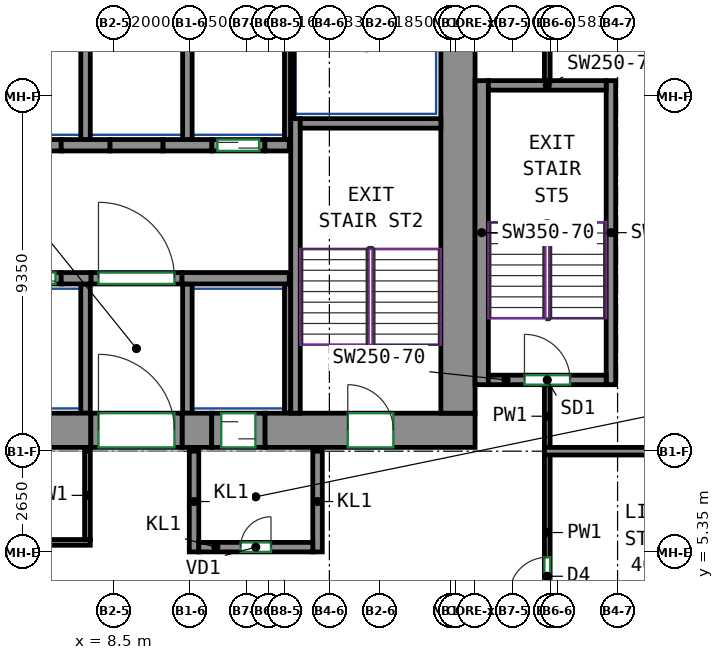
"""IFC4 building model, lengths in metres.
Left out: names, types, materials, properties, quantities, classifications, styles, units other than length and angle.
Written with IfcOpenShell. Run it as: python <this file> out.ifc"""

import sys

from ifc_helpers import new_model, si_unit, direction, frame, frame_2d, origin, place, context, subcontext, project, spatial, rectangle, extrude, source, transform, mapped, element, fill, save


model = new_model("IFC4")
c1 = context("Model", 3, precision=1e-05, world=origin(), true_north=direction((0.0, 1.0)))
c2 = subcontext(c1, "Body", "Model", "MODEL_VIEW")
j1 = project(units=[si_unit("LENGTHUNIT", "METRE"), si_unit("PLANEANGLEUNIT", "RADIAN")], contexts=[c1])
p1 = place(None, origin())
s1 = spatial("IfcSite", under=j1, at=p1, CompositionType="ELEMENT")
p2 = place(p1, origin())
s2 = spatial("IfcBuilding", under=s1, at=p2, CompositionType="ELEMENT")
p3 = place(p2, frame((0.0, 0.0, 171.9)))
s3 = spatial("IfcBuildingStorey", under=s2, at=p3, CompositionType="ELEMENT", Elevation=171.9)
m1 = source(origin(), c2, "Body", "SweptSolid", [
    extrude(rectangle(XDim=14.18, YDim=0.9, at=frame_2d((7.09, 0.0))), origin(), (0.0, 0.0, 1.0), 3.12),
])
p4 = place(p3, frame((-6.29, 8.55, 0.0), z_axis=(0.0, 0.0, 1.0), x_axis=(1.0, 0.0, 0.0)))
e1 = element("IfcWall", 1, at=p4, inside=s3, PredefinedType="SHEAR", context=c2, shape_type="MappedRepresentation", body=[
    mapped(m1, transform((0.0, 0.0, 0.0))),
])
m2 = source(origin(), c2, "Body", "SweptSolid", [
    extrude(rectangle(XDim=0.78, YDim=0.9, at=frame_2d((0.39, 0.0))), origin(), (0.0, 0.0, 1.0), 3.12),
])
p5 = place(p3, frame((10.29, 8.55, 0.0), z_axis=(0.0, 0.0, 1.0), x_axis=(1.0, 0.0, 0.0)))
e2 = element("IfcWall", 2, at=p5, inside=s3, PredefinedType="SHEAR", context=c2, shape_type="MappedRepresentation", body=[
    mapped(m2, transform((0.0, 0.0, 0.0))),
])
m3 = source(origin(), c2, "Body", "SweptSolid", [
    extrude(rectangle(XDim=5.53, YDim=0.9, at=frame_2d((2.765, 0.0))), origin(), (0.0, 0.0, 1.0), 3.12),
])
p6 = place(p3, frame((12.47, 8.55, 0.0), z_axis=(0.0, 0.0, 1.0), x_axis=(1.0, 0.0, 0.0)))
e3 = element("IfcWall", 3, at=p6, inside=s3, PredefinedType="SHEAR", context=c2, shape_type="MappedRepresentation", body=[
    mapped(m3, transform((0.0, 0.0, 0.0))),
])
p7 = place(p6, frame((2.18, 0.0, 0.0)))
e4 = element("IfcOpeningElement", 4, at=p7, cuts=e3, PredefinedType="OPENING", context=c2, shape_type="SweptSolid", body=[
    extrude(rectangle(XDim=1.2, YDim=2.1, at=frame_2d((0.6, 1.05))), frame((0.0, 0.46, 0.0), z_axis=(0.0, -1.0, 0.0), x_axis=(1.0, 0.0, 0.0)), (0.0, 0.0, 1.0), 0.92),
])
m4 = source(origin(), c2, "Body", "SweptSolid", [
    extrude(rectangle(XDim=12.0, YDim=0.9, at=frame_2d((6.0, 0.0))), origin(), (0.0, 0.0, 1.0), 3.12),
])
p8 = place(p3, frame((17.55, 9.0, 0.0), z_axis=(0.0, 0.0, 1.0), x_axis=(0.0, 1.0, 0.0)))
e5 = element("IfcWall", 5, at=p8, inside=s3, PredefinedType="SHEAR", context=c2, shape_type="MappedRepresentation", body=[
    mapped(m4, transform((0.0, 0.0, 0.0))),
])
m5 = source(origin(), c2, "Body", "SweptSolid", [
    extrude(rectangle(XDim=7.75, YDim=0.25, at=frame_2d((3.875, 0.0))), origin(), (0.0, 0.0, 1.0), 3.12),
])
p9 = place(p3, frame((13.275, 9.0, 0.0), z_axis=(0.0, 0.0, 1.0), x_axis=(0.0, 1.0, 0.0)))
e6 = element("IfcWall", 6, at=p9, inside=s3, PredefinedType="SHEAR", context=c2, shape_type="MappedRepresentation", body=[
    mapped(m5, transform((0.0, 0.0, 0.0))),
])
m6 = source(origin(), c2, "Body", "SweptSolid", [
    extrude(rectangle(XDim=3.7, YDim=0.25, at=frame_2d((1.85, 0.0))), origin(), (0.0, 0.0, 1.0), 3.12),
])
p10 = place(p3, frame((13.4, 16.625, 0.0), z_axis=(0.0, 0.0, 1.0), x_axis=(1.0, 0.0, 0.0)))
e7 = element("IfcWall", 7, at=p10, inside=s3, PredefinedType="SHEAR", context=c2, shape_type="MappedRepresentation", body=[
    mapped(m6, transform((0.0, 0.0, 0.0))),
])
m7 = source(origin(), c2, "Body", "SweptSolid", [
    extrude(rectangle(XDim=8.0, YDim=0.35, at=frame_2d((4.0, 0.0))), origin(), (0.0, 0.0, 1.0), 3.12),
])
p11 = place(p3, frame((18.175, 9.75, 0.0), z_axis=(0.0, 0.0, 1.0), x_axis=(0.0, 1.0, 0.0)))
e8 = element("IfcWall", 8, at=p11, inside=s3, PredefinedType="SHEAR", context=c2, shape_type="MappedRepresentation", body=[
    mapped(m7, transform((0.0, 0.0, 0.0))),
])
m8 = source(origin(), c2, "Body", "SweptSolid", [
    extrude(rectangle(XDim=8.0, YDim=0.25, at=frame_2d((4.0, 0.0))), origin(), (0.0, 0.0, 1.0), 3.12),
])
p12 = place(p3, frame((21.575, 9.75, 0.0), z_axis=(0.0, 0.0, 1.0), x_axis=(0.0, 1.0, 0.0)))
e9 = element("IfcWall", 9, at=p12, inside=s3, PredefinedType="SHEAR", context=c2, shape_type="MappedRepresentation", body=[
    mapped(m8, transform((0.0, 0.0, 0.0))),
])
m9 = source(origin(), c2, "Body", "SweptSolid", [
    extrude(rectangle(XDim=3.1, YDim=0.25, at=frame_2d((1.55, 0.0))), origin(), (0.0, 0.0, 1.0), 3.12),
])
p13 = place(p3, frame((18.35, 9.875, 0.0), z_axis=(0.0, 0.0, 1.0), x_axis=(1.0, 0.0, 0.0)))
e10 = element("IfcWall", 10, at=p13, inside=s3, PredefinedType="SHEAR", context=c2, shape_type="MappedRepresentation", body=[
    mapped(m9, transform((0.0, 0.0, 0.0))),
])
p14 = place(p13, frame((0.95, 0.0, 0.0)))
e11 = element("IfcOpeningElement", 11, at=p14, cuts=e10, PredefinedType="OPENING", context=c2, shape_type="SweptSolid", body=[
    extrude(rectangle(XDim=1.2, YDim=2.1, at=frame_2d((0.6, 1.05))), frame((0.0, 0.135, 0.0), z_axis=(0.0, -1.0, 0.0), x_axis=(1.0, 0.0, 0.0)), (0.0, 0.0, 1.0), 0.27),
])
p15 = place(p3, frame((18.35, 17.625, 0.0), z_axis=(0.0, 0.0, 1.0), x_axis=(1.0, 0.0, 0.0)))
e12 = element("IfcWall", 12, at=p15, inside=s3, PredefinedType="SHEAR", context=c2, shape_type="MappedRepresentation", body=[
    mapped(m9, transform((0.0, 0.0, 0.0))),
])
m10 = source(origin(), c2, "Body", "SweptSolid", [
    extrude(rectangle(XDim=0.78, YDim=0.3, at=frame_2d((0.39, 0.0))), origin(), (0.0, 0.0, 1.0), 3.12),
])
p16 = place(p3, frame((7.11, 12.55, 0.0), z_axis=(0.0, 0.0, 1.0), x_axis=(1.0, 0.0, 0.0)))
e13 = element("IfcWall", 13, at=p16, inside=s3, PredefinedType="SHEAR", context=c2, shape_type="MappedRepresentation", body=[
    mapped(m10, transform((0.0, 0.0, 0.0))),
])
m11 = source(origin(), c2, "Body", "SweptSolid", [
    extrude(rectangle(XDim=2.82, YDim=0.3, at=frame_2d((1.41, 0.0))), origin(), (0.0, 0.0, 1.0), 3.12),
])
p17 = place(p3, frame((10.29, 12.55, 0.0), z_axis=(0.0, 0.0, 1.0), x_axis=(1.0, 0.0, 0.0)))
e14 = element("IfcWall", 14, at=p17, inside=s3, PredefinedType="SHEAR", context=c2, shape_type="MappedRepresentation", body=[
    mapped(m11, transform((0.0, 0.0, 0.0))),
])
m12 = source(origin(), c2, "Body", "SweptSolid", [
    extrude(rectangle(XDim=1.28, YDim=0.3, at=frame_2d((0.64, 0.0))), origin(), (0.0, 0.0, 1.0), 3.12),
])
p18 = place(p3, frame((7.11, 16.05, 0.0), z_axis=(0.0, 0.0, 1.0), x_axis=(1.0, 0.0, 0.0)))
e15 = element("IfcWall", 15, at=p18, inside=s3, PredefinedType="SHEAR", context=c2, shape_type="MappedRepresentation", body=[
    mapped(m12, transform((0.0, 0.0, 0.0))),
])
m13 = source(origin(), c2, "Body", "SweptSolid", [
    extrude(rectangle(XDim=1.28, YDim=0.3, at=frame_2d((0.64, 0.0))), origin(), (0.0, 0.0, 1.0), 3.12),
])
p19 = place(p3, frame((9.79, 16.05, 0.0), z_axis=(0.0, 0.0, 1.0), x_axis=(1.0, 0.0, 0.0)))
e16 = element("IfcWall", 16, at=p19, inside=s3, PredefinedType="SHEAR", context=c2, shape_type="MappedRepresentation", body=[
    mapped(m13, transform((0.0, 0.0, 0.0))),
])
m14 = source(origin(), c2, "Body", "SweptSolid", [
    extrude(rectangle(XDim=0.64, YDim=0.3, at=frame_2d((0.32, 0.0))), origin(), (0.0, 0.0, 1.0), 3.12),
])
p20 = place(p3, frame((12.47, 16.05, 0.0), z_axis=(0.0, 0.0, 1.0), x_axis=(1.0, 0.0, 0.0)))
e17 = element("IfcWall", 17, at=p20, inside=s3, PredefinedType="SHEAR", context=c2, shape_type="MappedRepresentation", body=[
    mapped(m14, transform((0.0, 0.0, 0.0))),
])
m15 = source(origin(), c2, "Body", "SweptSolid", [
    extrude(rectangle(XDim=1.4, YDim=0.3, at=frame_2d((0.7, 0.0))), origin(), (0.0, 0.0, 1.0), 3.12),
])
p21 = place(p3, frame((5.71, 12.55, 0.0), z_axis=(0.0, 0.0, 1.0), x_axis=(1.0, 0.0, 0.0)))
e18 = element("IfcWall", 18, at=p21, inside=s3, PredefinedType="PARTITIONING", context=c2, shape_type="MappedRepresentation", body=[
    mapped(m15, transform((0.0, 0.0, 0.0))),
])
p22 = place(p21, frame((0.15, 0.0, 0.0)))
e19 = element("IfcOpeningElement", 19, at=p22, cuts=e18, PredefinedType="OPENING", context=c2, shape_type="SweptSolid", body=[
    extrude(rectangle(XDim=1.1, YDim=2.1, at=frame_2d((0.55, 1.05))), frame((0.0, 0.16, 0.0), z_axis=(0.0, -1.0, 0.0), x_axis=(1.0, 0.0, 0.0)), (0.0, 0.0, 1.0), 0.32),
])
m16 = source(origin(), c2, "Body", "SweptSolid", [
    extrude(rectangle(XDim=1.4, YDim=0.3, at=frame_2d((0.7, 0.0))), origin(), (0.0, 0.0, 1.0), 3.12),
])
p23 = place(p3, frame((11.07, 16.05, 0.0), z_axis=(0.0, 0.0, 1.0), x_axis=(1.0, 0.0, 0.0)))
e20 = element("IfcWall", 20, at=p23, inside=s3, PredefinedType="PARTITIONING", context=c2, shape_type="MappedRepresentation", body=[
    mapped(m16, transform((0.0, 0.0, 0.0))),
])
p24 = place(p23, frame((0.15, 0.0, 0.0)))
e21 = element("IfcOpeningElement", 21, at=p24, cuts=e20, PredefinedType="OPENING", context=c2, shape_type="SweptSolid", body=[
    extrude(rectangle(XDim=1.1, YDim=2.1, at=frame_2d((0.55, 1.05))), frame((0.0, 0.16, 0.0), z_axis=(0.0, -1.0, 0.0), x_axis=(1.0, 0.0, 0.0)), (0.0, 0.0, 1.0), 0.32),
])
m17 = source(origin(), c2, "Body", "SweptSolid", [
    extrude(rectangle(XDim=2.4, YDim=0.3, at=frame_2d((1.2, 0.0))), origin(), (0.0, 0.0, 1.0), 3.12),
])
p25 = place(p3, frame((7.89, 12.55, 0.0), z_axis=(0.0, 0.0, 1.0), x_axis=(1.0, 0.0, 0.0)))
e22 = element("IfcWall", 22, at=p25, inside=s3, PredefinedType="PARTITIONING", context=c2, shape_type="MappedRepresentation", body=[
    mapped(m17, transform((0.0, 0.0, 0.0))),
])
p26 = place(p25, frame((0.2, 0.0, 0.0)))
e23 = element("IfcOpeningElement", 23, at=p26, cuts=e22, PredefinedType="OPENING", context=c2, shape_type="SweptSolid", body=[
    extrude(rectangle(XDim=2.0, YDim=2.1, at=frame_2d((1.0, 1.05))), frame((0.0, 0.16, 0.0), z_axis=(0.0, -1.0, 0.0), x_axis=(1.0, 0.0, 0.0)), (0.0, 0.0, 1.0), 0.32),
])
for number, where, z_axis, x_axis in (
    (24, (5.71, 16.05, 0.0), (0.0, 0.0, 1.0), (1.0, 0.0, 0.0)),
    (25, (8.39, 16.05, 0.0), (0.0, 0.0, 1.0), (1.0, 0.0, 0.0)),
):
    element("IfcWall", number, at=place(p3, frame(where, z_axis=z_axis, x_axis=x_axis)), inside=s3, PredefinedType="PARTITIONING", context=c2, shape_type="MappedRepresentation", body=[
        mapped(m15, transform((0.0, 0.0, 0.0))),
    ])
m18 = source(origin(), c2, "Body", "SweptSolid", [
    extrude(rectangle(XDim=2.65, YDim=0.25, at=frame_2d((1.325, 0.0))), origin(), (0.0, 0.0, 1.0), 3.12),
])
for number, where, z_axis, x_axis in (
    (26, (10.605, 5.35, 0.0), (0.0, 0.0, 1.0), (0.0, 1.0, 0.0)),
    (27, (13.855, 5.35, 0.0), (0.0, 0.0, 1.0), (0.0, 1.0, 0.0)),
):
    element("IfcWall", number, at=place(p3, frame(where, z_axis=z_axis, x_axis=x_axis)), inside=s3, PredefinedType="PARTITIONING", context=c2, shape_type="MappedRepresentation", body=[
        mapped(m18, transform((0.0, 0.0, 0.0))),
    ])
m19 = source(origin(), c2, "Body", "SweptSolid", [
    extrude(rectangle(XDim=3.0, YDim=0.25, at=frame_2d((1.5, 0.0))), origin(), (0.0, 0.0, 1.0), 3.12),
])
p27 = place(p3, frame((10.73, 5.475, 0.0), z_axis=(0.0, 0.0, 1.0), x_axis=(1.0, 0.0, 0.0)))
e28 = element("IfcWall", 28, at=p27, inside=s3, PredefinedType="PARTITIONING", context=c2, shape_type="MappedRepresentation", body=[
    mapped(m19, transform((0.0, 0.0, 0.0))),
])
p28 = place(p27, frame((1.1, 0.0, 0.0)))
e29 = element("IfcOpeningElement", 29, at=p28, cuts=e28, PredefinedType="OPENING", context=c2, shape_type="SweptSolid", body=[
    extrude(rectangle(XDim=0.8, YDim=2.0, at=frame_2d((0.4, 1.0))), frame((0.0, 0.135, 0.0), z_axis=(0.0, -1.0, 0.0), x_axis=(1.0, 0.0, 0.0)), (0.0, 0.0, 1.0), 0.27),
])
m20 = source(origin(), c2, "Body", "SweptSolid", [
    extrude(rectangle(XDim=3.275, YDim=0.165, at=frame_2d((1.638, 0.0))), origin(), (0.0, 0.0, 1.0), 3.12),
])
p29 = place(p3, frame((13.067, 16.2, 0.0), z_axis=(0.0, 0.0, 1.0), x_axis=(0.0, 1.0, 0.0)))
e30 = element("IfcWall", 30, at=p29, inside=s3, PredefinedType="PARTITIONING", context=c2, shape_type="MappedRepresentation", body=[
    mapped(m20, transform((0.0, 0.0, 0.0))),
])
m21 = source(origin(), c2, "Body", "SweptSolid", [
    extrude(rectangle(XDim=3.275, YDim=0.25, at=frame_2d((1.638, 0.0))), origin(), (0.0, 0.0, 1.0), 3.12),
])
p30 = place(p3, frame((10.43, 16.2, 0.0), z_axis=(0.0, 0.0, 1.0), x_axis=(0.0, 1.0, 0.0)))
e31 = element("IfcWall", 31, at=p30, inside=s3, PredefinedType="PARTITIONING", context=c2, shape_type="MappedRepresentation", body=[
    mapped(m21, transform((0.0, 0.0, 0.0))),
])
m22 = source(origin(), c2, "Body", "SweptSolid", [
    extrude(rectangle(XDim=2.725, YDim=0.085, at=frame_2d((1.363, 0.0))), origin(), (0.0, 0.0, 1.0), 3.12),
])
p31 = place(p3, frame((13.192, 16.75, 0.0), z_axis=(0.0, 0.0, 1.0), x_axis=(0.0, 1.0, 0.0)))
e32 = element("IfcWall", 32, at=p31, inside=s3, PredefinedType="PARTITIONING", context=c2, shape_type="MappedRepresentation", body=[
    mapped(m22, transform((0.0, 0.0, 0.0))),
])
p32 = place(p3, frame((7.75, 16.2, 0.0), z_axis=(0.0, 0.0, 1.0), x_axis=(0.0, 1.0, 0.0)))
e33 = element("IfcWall", 33, at=p32, inside=s3, PredefinedType="PARTITIONING", context=c2, shape_type="MappedRepresentation", body=[
    mapped(m21, transform((0.0, 0.0, 0.0))),
])
m23 = source(origin(), c2, "Body", "SweptSolid", [
    extrude(rectangle(XDim=3.4, YDim=0.25, at=frame_2d((1.7, 0.0))), origin(), (0.0, 0.0, 1.0), 3.12),
])
p33 = place(p3, frame((10.43, 9.0, 0.0), z_axis=(0.0, 0.0, 1.0), x_axis=(0.0, 1.0, 0.0)))
e34 = element("IfcWall", 34, at=p33, inside=s3, PredefinedType="PARTITIONING", context=c2, shape_type="MappedRepresentation", body=[
    mapped(m23, transform((0.0, 0.0, 0.0))),
])
m24 = source(origin(), c2, "Body", "SweptSolid", [
    extrude(rectangle(XDim=3.4, YDim=0.165, at=frame_2d((1.7, 0.0))), origin(), (0.0, 0.0, 1.0), 3.12),
])
p34 = place(p3, frame((13.067, 9.0, 0.0), z_axis=(0.0, 0.0, 1.0), x_axis=(0.0, 1.0, 0.0)))
e35 = element("IfcWall", 35, at=p34, inside=s3, PredefinedType="PARTITIONING", context=c2, shape_type="MappedRepresentation", body=[
    mapped(m24, transform((0.0, 0.0, 0.0))),
])
p35 = place(p3, frame((7.75, 9.0, 0.0), z_axis=(0.0, 0.0, 1.0), x_axis=(0.0, 1.0, 0.0)))
e36 = element("IfcWall", 36, at=p35, inside=s3, PredefinedType="PARTITIONING", context=c2, shape_type="MappedRepresentation", body=[
    mapped(m23, transform((0.0, 0.0, 0.0))),
])
m25 = source(origin(), c2, "Body", "SweptSolid", [
    extrude(rectangle(XDim=2.4, YDim=0.9, at=frame_2d((1.2, 0.0))), origin(), (0.0, 0.0, 1.0), 2.7),
])
p36 = place(p3, frame((7.89, 8.55, 0.0), z_axis=(0.0, 0.0, 1.0), x_axis=(1.0, 0.0, 0.0)))
e37 = element("IfcWall", 37, at=p36, inside=s3, PredefinedType="PARTITIONING", context=c2, shape_type="MappedRepresentation", body=[
    mapped(m25, transform((0.0, 0.0, 0.0))),
])
p37 = place(p36, frame((0.2, 0.0, 0.0)))
e38 = element("IfcOpeningElement", 38, at=p37, cuts=e37, PredefinedType="OPENING", context=c2, shape_type="SweptSolid", body=[
    extrude(rectangle(XDim=2.0, YDim=2.1, at=frame_2d((1.0, 1.05))), frame((0.0, 0.46, 0.0), z_axis=(0.0, -1.0, 0.0), x_axis=(1.0, 0.0, 0.0)), (0.0, 0.0, 1.0), 0.92),
])
m26 = source(origin(), c2, "Body", "SweptSolid", [
    extrude(rectangle(XDim=1.4, YDim=0.9, at=frame_2d((0.7, 0.0))), origin(), (0.0, 0.0, 1.0), 2.7),
])
p38 = place(p3, frame((11.07, 8.55, 0.0), z_axis=(0.0, 0.0, 1.0), x_axis=(1.0, 0.0, 0.0)))
e39 = element("IfcWall", 39, at=p38, inside=s3, PredefinedType="PARTITIONING", context=c2, shape_type="MappedRepresentation", body=[
    mapped(m26, transform((0.0, 0.0, 0.0))),
])
p39 = place(p38, frame((0.25, 0.0, 0.0)))
e40 = element("IfcOpeningElement", 40, at=p39, cuts=e39, PredefinedType="OPENING", context=c2, shape_type="SweptSolid", body=[
    extrude(rectangle(XDim=0.9, YDim=2.1, at=frame_2d((0.45, 1.05))), frame((0.0, 0.46, 0.0), z_axis=(0.0, -1.0, 0.0), x_axis=(1.0, 0.0, 0.0)), (0.0, 0.0, 1.0), 0.92),
])
p40 = place(p3, frame((19.9, 3.809, 0.0), z_axis=(0.0, 0.0, 1.0), x_axis=(0.0, 1.0, 0.0)))
e41 = element("IfcWall", 41, at=p40, inside=s3, PredefinedType="PARTITIONING", context=c2, shape_type="SweptSolid", body=[
    extrude(rectangle(XDim=4.101, YDim=0.15, at=frame_2d((2.05, 0.0))), origin(), (0.0, 0.0, 1.0), 3.12),
])
p41 = place(p40, frame((0.4, 0.0, 0.0)))
e42 = element("IfcOpeningElement", 42, at=p41, cuts=e41, PredefinedType="OPENING", context=c2, shape_type="SweptSolid", body=[
    extrude(rectangle(XDim=1.0, YDim=2.1, at=frame_2d((0.5, 1.05))), frame((0.0, 0.085, 0.0), z_axis=(0.0, -1.0, 0.0), x_axis=(1.0, 0.0, 0.0)), (0.0, 0.0, 1.0), 0.17),
])
p42 = place(p3, frame((19.9, 17.75, 0.0), z_axis=(0.0, 0.0, 1.0), x_axis=(0.0, 1.0, 0.0)))
e43 = element("IfcWall", 43, at=p42, inside=s3, PredefinedType="PARTITIONING", context=c2, shape_type="SweptSolid", body=[
    extrude(rectangle(XDim=4.175, YDim=0.15, at=frame_2d((2.087, 0.0))), origin(), (0.0, 0.0, 1.0), 3.12),
])
p43 = place(p42, frame((1.432, 0.0, 0.0)))
e44 = element("IfcOpeningElement", 44, at=p43, cuts=e43, PredefinedType="OPENING", context=c2, shape_type="SweptSolid", body=[
    extrude(rectangle(XDim=0.9, YDim=2.1, at=frame_2d((0.45, 1.05))), frame((0.0, 0.085, 0.0), z_axis=(0.0, -1.0, 0.0), x_axis=(1.0, 0.0, 0.0)), (0.0, 0.0, 1.0), 0.17),
])
p44 = place(p3, frame((19.9, 8.09, 0.0), z_axis=(0.0, 0.0, 1.0), x_axis=(0.0, 1.0, 0.0)))
e45 = element("IfcWall", 45, at=p44, inside=s3, PredefinedType="PARTITIONING", context=c2, shape_type="SweptSolid", body=[
    extrude(rectangle(XDim=1.66, YDim=0.15, at=frame_2d((0.83, 0.0))), origin(), (0.0, 0.0, 1.0), 3.12),
])
p45 = place(p3, frame((7.875, 5.6, 0.0), z_axis=(0.0, 0.0, 1.0), x_axis=(-1.0, 0.0, 0.0)))
e46 = element("IfcWall", 46, at=p45, inside=s3, PredefinedType="PARTITIONING", context=c2, shape_type="SweptSolid", body=[
    extrude(rectangle(XDim=13.275, YDim=0.15, at=frame_2d((6.637, 0.0))), origin(), (0.0, 0.0, 1.0), 3.12),
])
p46 = place(p45, frame((5.433, 0.0, 0.0)))
e47 = element("IfcOpeningElement", 47, at=p46, cuts=e46, PredefinedType="OPENING", context=c2, shape_type="SweptSolid", body=[
    extrude(rectangle(XDim=1.0, YDim=2.1, at=frame_2d((0.5, 1.05))), frame((0.0, 0.085, 0.0), z_axis=(0.0, -1.0, 0.0), x_axis=(1.0, 0.0, 0.0)), (0.0, 0.0, 1.0), 0.17),
])
p47 = place(p3, frame((7.8, 8.0, 0.0), z_axis=(0.0, 0.0, 1.0), x_axis=(0.0, -1.0, 0.0)))
e48 = element("IfcWall", 48, at=p47, inside=s3, PredefinedType="PARTITIONING", context=c2, shape_type="SweptSolid", body=[
    extrude(rectangle(XDim=2.325, YDim=0.15, at=frame_2d((1.163, 0.0))), origin(), (0.0, 0.0, 1.0), 3.12),
])
p48 = place(p3, frame((19.827, 8.0, 0.0), z_axis=(0.0, 0.0, 1.0), x_axis=(1.0, 0.0, 0.0)))
e49 = element("IfcWall", 49, at=p48, inside=s3, PredefinedType="PARTITIONING", context=c2, shape_type="SweptSolid", body=[
    extrude(rectangle(XDim=4.573, YDim=0.2, at=frame_2d((2.287, 0.0))), origin(), (0.0, 0.0, 1.0), 3.12),
])
p49 = place(p26, origin())
e50 = element("IfcDoor", 50, at=p49, inside=s3, OperationType="DOUBLE_DOOR_SINGLE_SWING", PredefinedType="DOOR", context=c2, shape_type="SweptSolid", body=[
    extrude(rectangle(XDim=2.0, YDim=2.1, at=frame_2d((1.0, 1.05))), frame((0.0, 0.025, 0.0), z_axis=(0.0, -1.0, 0.0), x_axis=(1.0, 0.0, 0.0)), (0.0, 0.0, 1.0), 0.05),
])
fill(e23, e50)
p50 = place(p37, origin())
e51 = element("IfcDoor", 51, at=p50, inside=s3, OperationType="DOUBLE_DOOR_SINGLE_SWING", PredefinedType="DOOR", context=c2, shape_type="SweptSolid", body=[
    extrude(rectangle(XDim=2.0, YDim=2.1, at=frame_2d((1.0, 1.05))), frame((0.0, 0.355, 0.0), z_axis=(0.0, -1.0, 0.0), x_axis=(1.0, 0.0, 0.0)), (0.0, 0.0, 1.0), 0.05),
])
fill(e38, e51)
p51 = place(p28, origin())
e52 = element("IfcDoor", 52, at=p51, inside=s3, OperationType="SINGLE_SWING_RIGHT", PredefinedType="DOOR", context=c2, shape_type="SweptSolid", body=[
    extrude(rectangle(XDim=0.8, YDim=2.0, at=frame_2d((0.4, 1.0))), frame((0.0, 0.025, 0.0), z_axis=(0.0, -1.0, 0.0), x_axis=(1.0, 0.0, 0.0)), (0.0, 0.0, 1.0), 0.05),
])
fill(e29, e52)
p52 = place(p39, origin())
e53 = element("IfcDoor", 53, at=p52, inside=s3, OperationType="SLIDING_TO_LEFT", PredefinedType="DOOR", context=c2, shape_type="SweptSolid", body=[
    extrude(rectangle(XDim=0.9, YDim=2.1, at=frame_2d((0.45, 1.05))), frame((0.0, 0.355, 0.0), z_axis=(0.0, -1.0, 0.0), x_axis=(1.0, 0.0, 0.0)), (0.0, 0.0, 1.0), 0.05),
])
fill(e40, e53)
p53 = place(p22, origin())
e54 = element("IfcDoor", 54, at=p53, inside=s3, OperationType="DOUBLE_DOOR_SLIDING", PredefinedType="DOOR", context=c2, shape_type="SweptSolid", body=[
    extrude(rectangle(XDim=1.1, YDim=2.1, at=frame_2d((0.55, 1.05))), frame((0.0, 0.025, 0.0), z_axis=(0.0, -1.0, 0.0), x_axis=(1.0, 0.0, 0.0)), (0.0, 0.0, 1.0), 0.05),
])
fill(e19, e54)
p54 = place(p24, origin())
e55 = element("IfcDoor", 55, at=p54, inside=s3, OperationType="DOUBLE_DOOR_SLIDING", PredefinedType="DOOR", context=c2, shape_type="SweptSolid", body=[
    extrude(rectangle(XDim=1.1, YDim=2.1, at=frame_2d((0.55, 1.05))), frame((0.0, 0.025, 0.0), z_axis=(0.0, -1.0, 0.0), x_axis=(1.0, 0.0, 0.0)), (0.0, 0.0, 1.0), 0.05),
])
fill(e21, e55)
p55 = place(p7, origin())
e56 = element("IfcDoor", 56, at=p55, inside=s3, OperationType="DOUBLE_DOOR_SINGLE_SWING", PredefinedType="DOOR", context=c2, shape_type="SweptSolid", body=[
    extrude(rectangle(XDim=1.2, YDim=2.1, at=frame_2d((0.6, 1.05))), frame((0.0, 0.355, 0.0), z_axis=(0.0, -1.0, 0.0), x_axis=(1.0, 0.0, 0.0)), (0.0, 0.0, 1.0), 0.05),
])
fill(e4, e56)
p56 = place(p14, origin())
e57 = element("IfcDoor", 57, at=p56, inside=s3, OperationType="DOUBLE_DOOR_SINGLE_SWING", PredefinedType="DOOR", context=c2, shape_type="SweptSolid", body=[
    extrude(rectangle(XDim=1.2, YDim=2.1, at=frame_2d((0.6, 1.05))), frame((0.0, 0.025, 0.0), z_axis=(0.0, -1.0, 0.0), x_axis=(1.0, 0.0, 0.0)), (0.0, 0.0, 1.0), 0.05),
])
fill(e11, e57)
p57 = place(p41, origin())
e58 = element("IfcDoor", 58, at=p57, inside=s3, OperationType="SINGLE_SWING_LEFT", PredefinedType="DOOR", context=c2, shape_type="SweptSolid", body=[
    extrude(rectangle(XDim=1.0, YDim=2.1, at=frame_2d((0.5, 1.05))), frame((0.0, 0.025, 0.0), z_axis=(0.0, -1.0, 0.0), x_axis=(1.0, 0.0, 0.0)), (0.0, 0.0, 1.0), 0.05),
])
fill(e42, e58)
save(model, sys.argv[1])
